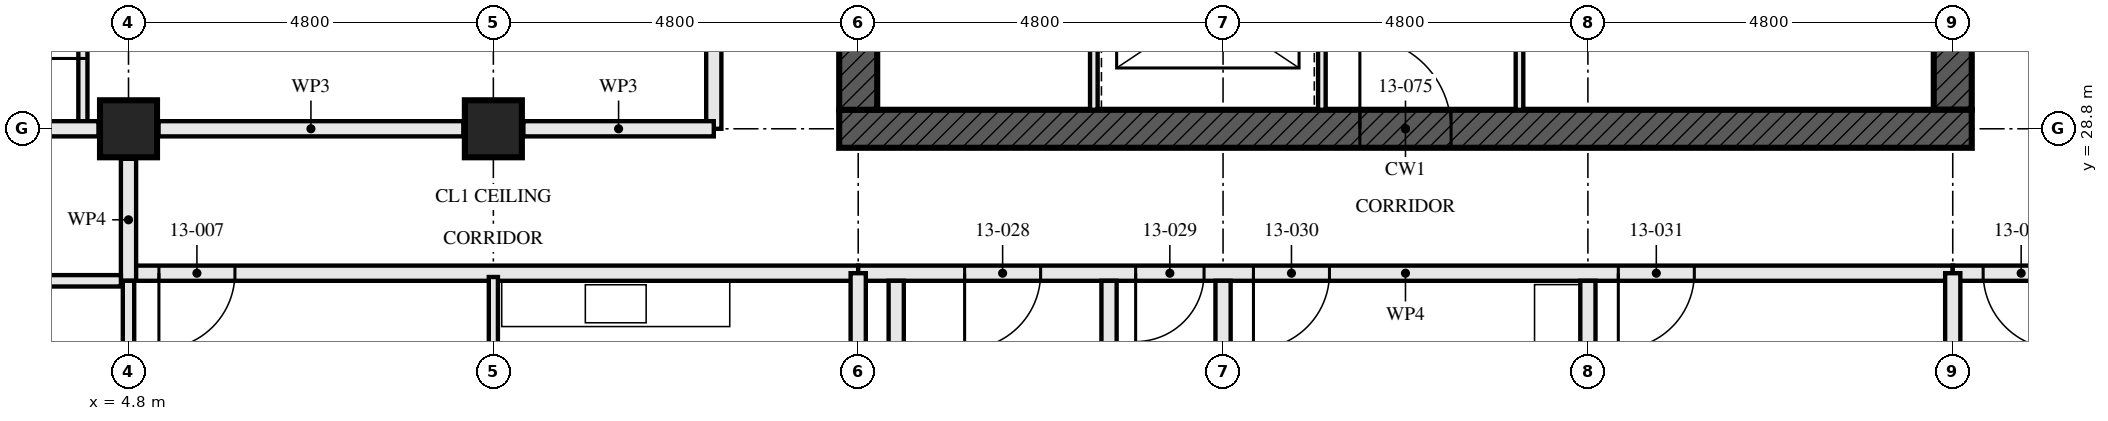
"""IFC4 building model, lengths in metres.
Left out: names, types, materials, properties, quantities, classifications, styles, units other than length and angle.
Written with IfcOpenShell. Run it as: python <this file> out.ifc"""

import sys

from ifc_helpers import new_model, si_unit, direction, frame, frame_2d, origin, origin_2d, place, context, subcontext, project, spatial, rectangle, hollow_rectangle, extrude, element, fill, save


model = new_model("IFC4")
c1 = context("Model", 3, precision=1e-05, world=origin(), true_north=direction((0.0, 1.0)))
c2 = subcontext(c1, "Body", "Model", "MODEL_VIEW")
j1 = project(units=[si_unit("LENGTHUNIT", "METRE"), si_unit("PLANEANGLEUNIT", "RADIAN")], contexts=[c1])
p1 = place(None, origin())
s1 = spatial("IfcSite", under=j1, at=p1, CompositionType="ELEMENT")
p2 = place(p1, origin())
s2 = spatial("IfcBuilding", under=s1, at=p2, CompositionType="ELEMENT")
p3 = place(p2, frame((0.0, 0.0, 51.5)))
s3 = spatial("IfcBuildingStorey", under=s2, at=p3, CompositionType="ELEMENT", Elevation=51.5)
for number, where, z_axis, x_axis in (
    (1, (4.8, 28.8, 0.0), (0.0, 0.0, 1.0), (0.0, 1.0, 0.0)),
    (2, (9.6, 28.8, 0.0), (0.0, 0.0, 1.0), (0.0, 1.0, 0.0)),
):
    element("IfcColumn", number, at=place(p3, frame(where, z_axis=z_axis, x_axis=x_axis)), inside=s3, PredefinedType="COLUMN", context=c2, shape_type="SweptSolid", body=[
        extrude(hollow_rectangle(XDim=0.75, YDim=0.75, WallThickness=0.08, at=origin_2d()), origin(), (0.0, 0.0, 1.0), 3.5),
    ])
p4 = place(p3, frame((14.15, 28.8, -0.17), z_axis=(0.0, 0.0, 1.0), x_axis=(1.0, 0.0, 0.0)))
e3 = element("IfcWall", 3, at=p4, inside=s3, PredefinedType="SHEAR", context=c2, shape_type="SweptSolid", body=[
    extrude(rectangle(XDim=14.9, YDim=0.5, at=frame_2d((7.45, 0.0))), origin(), (0.0, 0.0, 1.0), 3.5),
])
p5 = place(p4, frame((6.85, 0.0, 0.17)))
e4 = element("IfcOpeningElement", 4, at=p5, cuts=e3, PredefinedType="OPENING", context=c2, shape_type="SweptSolid", body=[
    extrude(rectangle(XDim=1.2, YDim=2.1, at=frame_2d((0.6, 1.05))), frame((0.0, 0.26, 0.0), z_axis=(0.0, -1.0, 0.0), x_axis=(1.0, 0.0, 0.0)), (0.0, 0.0, 1.0), 0.521),
])
p6 = place(p3, frame((14.4, 42.95, -0.17), z_axis=(0.0, 0.0, 1.0), x_axis=(0.0, -1.0, 0.0)))
e5 = element("IfcWall", 5, at=p6, inside=s3, PredefinedType="SHEAR", context=c2, shape_type="SweptSolid", body=[
    extrude(rectangle(XDim=13.9, YDim=0.5, at=frame_2d((6.95, 0.0))), origin(), (0.0, 0.0, 1.0), 3.5),
])
p7 = place(p6, frame((6.35, 0.0, 0.17)))
e6 = element("IfcOpeningElement", 6, at=p7, cuts=e5, PredefinedType="OPENING", context=c2, shape_type="SweptSolid", body=[
    extrude(rectangle(XDim=1.2, YDim=2.1, at=frame_2d((0.6, 1.05))), frame((0.0, 0.26, 0.0), z_axis=(0.0, -1.0, 0.0), x_axis=(1.0, 0.0, 0.0)), (0.0, 0.0, 1.0), 0.521),
])
p8 = place(p3, frame((28.8, 29.05, -0.17), z_axis=(0.0, 0.0, 1.0), x_axis=(0.0, 1.0, 0.0)))
e7 = element("IfcWall", 7, at=p8, inside=s3, PredefinedType="SHEAR", context=c2, shape_type="SweptSolid", body=[
    extrude(rectangle(XDim=13.9, YDim=0.5, at=frame_2d((6.95, 0.0))), origin(), (0.0, 0.0, 1.0), 3.5),
])
p9 = place(p8, frame((6.35, 0.0, 0.17)))
e8 = element("IfcOpeningElement", 8, at=p9, cuts=e7, PredefinedType="OPENING", context=c2, shape_type="SweptSolid", body=[
    extrude(rectangle(XDim=1.2, YDim=2.1, at=frame_2d((0.6, 1.05))), frame((0.0, 0.26, 0.0), z_axis=(0.0, -1.0, 0.0), x_axis=(1.0, 0.0, 0.0)), (0.0, 0.0, 1.0), 0.521),
])
p10 = place(p3, frame((4.8, 23.8, 0.0), z_axis=(0.0, 0.0, 1.0), x_axis=(0.0, 1.0, 0.0)))
e9 = element("IfcWall", 9, at=p10, inside=s3, PredefinedType="PARTITIONING", context=c2, shape_type="SweptSolid", body=[
    extrude(rectangle(XDim=3.0, YDim=0.15, at=frame_2d((1.5, 0.0))), origin(), (0.0, 0.0, 1.0), 2.55),
])
p11 = place(p10, frame((1.05, 0.0, 0.0)))
e10 = element("IfcOpeningElement", 10, at=p11, cuts=e9, PredefinedType="OPENING", context=c2, shape_type="SweptSolid", body=[
    extrude(rectangle(XDim=0.9, YDim=2.1, at=frame_2d((0.45, 1.05))), frame((0.0, 0.085, 0.0), z_axis=(0.0, -1.0, 0.0), x_axis=(1.0, 0.0, 0.0)), (0.0, 0.0, 1.0), 0.171),
])
p12 = place(p3, frame((9.6, 18.6, 0.0), z_axis=(0.0, 0.0, 1.0), x_axis=(0.0, 1.0, 0.0)))
e11 = element("IfcWall", 11, at=p12, inside=s3, PredefinedType="PARTITIONING", context=c2, shape_type="SweptSolid", body=[
    extrude(rectangle(XDim=8.25, YDim=0.12, at=frame_2d((4.125, 0.0))), origin(), (0.0, 0.0, 1.0), 2.55),
])
p13 = place(p12, frame((5.15, 0.0, 0.0)))
e12 = element("IfcOpeningElement", 12, at=p13, cuts=e11, PredefinedType="OPENING", context=c2, shape_type="SweptSolid", body=[
    extrude(rectangle(XDim=0.9, YDim=2.1, at=frame_2d((0.45, 1.05))), frame((0.0, 0.071, 0.0), z_axis=(0.0, -1.0, 0.0), x_axis=(1.0, 0.0, 0.0)), (0.0, 0.0, 1.0), 0.141),
])
p14 = place(p3, frame((4.8, 26.9, 0.0), z_axis=(0.0, 0.0, 1.0), x_axis=(1.0, 0.0, 0.0)))
e13 = element("IfcWall", 13, at=p14, inside=s3, PredefinedType="PARTITIONING", context=c2, shape_type="SweptSolid", body=[
    extrude(rectangle(XDim=9.6, YDim=0.2, at=frame_2d((4.8, 0.0))), origin(), (0.0, 0.0, 1.0), 3.33),
])
p15 = place(p14, frame((0.4, 0.0, 0.0)))
e14 = element("IfcOpeningElement", 14, at=p15, cuts=e13, PredefinedType="OPENING", context=c2, shape_type="SweptSolid", body=[
    extrude(rectangle(XDim=1.0, YDim=2.1, at=frame_2d((0.5, 1.05))), frame((0.0, 0.111, 0.0), z_axis=(0.0, -1.0, 0.0), x_axis=(1.0, 0.0, 0.0)), (0.0, 0.0, 1.0), 0.221),
])
p16 = place(p3, frame((4.8, 26.8, 0.0), z_axis=(0.0, 0.0, 1.0), x_axis=(0.0, 1.0, 0.0)))
e15 = element("IfcWall", 15, at=p16, inside=s3, PredefinedType="PARTITIONING", context=c2, shape_type="SweptSolid", body=[
    extrude(rectangle(XDim=1.605, YDim=0.2, at=frame_2d((0.802, 0.0))), origin(), (0.0, 0.0, 1.0), 3.33),
])
p17 = place(p3, frame((4.2, 33.6, 0.0), z_axis=(0.0, 0.0, 1.0), x_axis=(0.0, -1.0, 0.0)))
e16 = element("IfcWall", 16, at=p17, inside=s3, PredefinedType="PARTITIONING", context=c2, shape_type="SweptSolid", body=[
    extrude(rectangle(XDim=4.8, YDim=0.12, at=frame_2d((2.4, 0.0))), origin(), (0.0, 0.0, 1.0), 3.33),
])
p18 = place(p17, frame((2.975, 0.0, 0.0)))
e17 = element("IfcOpeningElement", 17, at=p18, cuts=e16, PredefinedType="OPENING", context=c2, shape_type="SweptSolid", body=[
    extrude(rectangle(XDim=0.9, YDim=2.1, at=frame_2d((0.45, 1.05))), frame((0.0, 0.071, 0.0), z_axis=(0.0, -1.0, 0.0), x_axis=(1.0, 0.0, 0.0)), (0.0, 0.0, 1.0), 0.141),
])
p19 = place(p3, frame((12.5, 43.2, 0.0), z_axis=(0.0, 0.0, 1.0), x_axis=(0.0, -1.0, 0.0)))
e18 = element("IfcWall", 18, at=p19, inside=s3, PredefinedType="PARTITIONING", context=c2, shape_type="SweptSolid", body=[
    extrude(rectangle(XDim=14.4, YDim=0.2, at=frame_2d((7.2, 0.0))), origin(), (0.0, 0.0, 1.0), 2.55),
])
p20 = place(p19, frame((1.4, 0.0, 0.0)))
e19 = element("IfcOpeningElement", 19, at=p20, cuts=e18, PredefinedType="OPENING", context=c2, shape_type="SweptSolid", body=[
    extrude(rectangle(XDim=1.0, YDim=2.1, at=frame_2d((0.5, 1.05))), frame((0.0, 0.111, 0.0), z_axis=(0.0, -1.0, 0.0), x_axis=(1.0, 0.0, 0.0)), (0.0, 0.0, 1.0), 0.221),
])
p21 = place(p19, frame((5.2, 0.0, 0.0)))
e20 = element("IfcOpeningElement", 20, at=p21, cuts=e18, PredefinedType="OPENING", context=c2, shape_type="SweptSolid", body=[
    extrude(rectangle(XDim=1.0, YDim=2.1, at=frame_2d((0.5, 1.05))), frame((0.0, 0.111, 0.0), z_axis=(0.0, -1.0, 0.0), x_axis=(1.0, 0.0, 0.0)), (0.0, 0.0, 1.0), 0.221),
])
p22 = place(p19, frame((10.0, 0.0, 0.0)))
e21 = element("IfcOpeningElement", 21, at=p22, cuts=e18, PredefinedType="OPENING", context=c2, shape_type="SweptSolid", body=[
    extrude(rectangle(XDim=1.0, YDim=2.1, at=frame_2d((0.5, 1.05))), frame((0.0, 0.111, 0.0), z_axis=(0.0, -1.0, 0.0), x_axis=(1.0, 0.0, 0.0)), (0.0, 0.0, 1.0), 0.221),
])
for number, where, z_axis, x_axis in (
    (22, (14.9, 22.1, 0.0), (0.0, 0.0, 1.0), (0.0, 1.0, 0.0)),
    (23, (17.7, 22.1, 0.0), (0.0, 0.0, 1.0), (0.0, 1.0, 0.0)),
):
    element("IfcWall", number, at=place(p3, frame(where, z_axis=z_axis, x_axis=x_axis)), inside=s3, PredefinedType="SOLIDWALL", context=c2, shape_type="SweptSolid", body=[
        extrude(rectangle(XDim=4.7, YDim=0.2, at=frame_2d((2.35, 0.0))), origin(), (0.0, 0.0, 1.0), 2.99),
    ])
for number, where, z_axis, x_axis in (
    (24, (19.2, 14.795, 0.0), (0.0, 0.0, 1.0), (0.0, 1.0, 0.0)),
    (25, (24.0, 14.795, 0.0), (0.0, 0.0, 1.0), (0.0, 1.0, 0.0)),
):
    element("IfcWall", number, at=place(p3, frame(where, z_axis=z_axis, x_axis=x_axis)), inside=s3, PredefinedType="PARTITIONING", context=c2, shape_type="SweptSolid", body=[
        extrude(rectangle(XDim=12.005, YDim=0.2, at=frame_2d((6.002, 0.0))), origin(), (0.0, 0.0, 1.0), 2.55),
    ])
p23 = place(p3, frame((14.4, 26.9, 0.0), z_axis=(0.0, 0.0, 1.0), x_axis=(1.0, 0.0, 0.0)))
e26 = element("IfcWall", 26, at=p23, inside=s3, PredefinedType="PARTITIONING", context=c2, shape_type="SweptSolid", body=[
    extrude(rectangle(XDim=14.4, YDim=0.2, at=frame_2d((7.2, 0.0))), origin(), (0.0, 0.0, 1.0), 2.55),
])
p24 = place(p23, frame((1.4, 0.0, 0.0)))
e27 = element("IfcOpeningElement", 27, at=p24, cuts=e26, PredefinedType="OPENING", context=c2, shape_type="SweptSolid", body=[
    extrude(rectangle(XDim=1.0, YDim=2.1, at=frame_2d((0.5, 1.05))), frame((0.0, 0.111, 0.0), z_axis=(0.0, -1.0, 0.0), x_axis=(1.0, 0.0, 0.0)), (0.0, 0.0, 1.0), 0.221),
])
p25 = place(p23, frame((3.65, 0.0, 0.0)))
e28 = element("IfcOpeningElement", 28, at=p25, cuts=e26, PredefinedType="OPENING", context=c2, shape_type="SweptSolid", body=[
    extrude(rectangle(XDim=0.9, YDim=2.1, at=frame_2d((0.45, 1.05))), frame((0.0, 0.111, 0.0), z_axis=(0.0, -1.0, 0.0), x_axis=(1.0, 0.0, 0.0)), (0.0, 0.0, 1.0), 0.221),
])
p26 = place(p23, frame((5.2, 0.0, 0.0)))
e29 = element("IfcOpeningElement", 29, at=p26, cuts=e26, PredefinedType="OPENING", context=c2, shape_type="SweptSolid", body=[
    extrude(rectangle(XDim=1.0, YDim=2.1, at=frame_2d((0.5, 1.05))), frame((0.0, 0.111, 0.0), z_axis=(0.0, -1.0, 0.0), x_axis=(1.0, 0.0, 0.0)), (0.0, 0.0, 1.0), 0.221),
])
p27 = place(p23, frame((10.0, 0.0, 0.0)))
e30 = element("IfcOpeningElement", 30, at=p27, cuts=e26, PredefinedType="OPENING", context=c2, shape_type="SweptSolid", body=[
    extrude(rectangle(XDim=1.0, YDim=2.1, at=frame_2d((0.5, 1.05))), frame((0.0, 0.111, 0.0), z_axis=(0.0, -1.0, 0.0), x_axis=(1.0, 0.0, 0.0)), (0.0, 0.0, 1.0), 0.221),
])
p28 = place(p3, frame((28.8, 26.9, 0.0), z_axis=(0.0, 0.0, 1.0), x_axis=(1.0, 0.0, 0.0)))
e31 = element("IfcWall", 31, at=p28, inside=s3, PredefinedType="PARTITIONING", context=c2, shape_type="SweptSolid", body=[
    extrude(rectangle(XDim=9.6, YDim=0.2, at=frame_2d((4.8, 0.0))), origin(), (0.0, 0.0, 1.0), 3.33),
])
p29 = place(p28, frame((0.4, 0.0, 0.0)))
e32 = element("IfcOpeningElement", 32, at=p29, cuts=e31, PredefinedType="OPENING", context=c2, shape_type="SweptSolid", body=[
    extrude(rectangle(XDim=1.0, YDim=2.1, at=frame_2d((0.5, 1.05))), frame((0.0, 0.111, 0.0), z_axis=(0.0, -1.0, 0.0), x_axis=(1.0, 0.0, 0.0)), (0.0, 0.0, 1.0), 0.221),
])
p30 = place(p3, frame((20.5, 29.05, 0.0), z_axis=(0.0, 0.0, 1.0), x_axis=(0.0, 1.0, 0.0)))
e33 = element("IfcWall", 33, at=p30, inside=s3, PredefinedType="SOLIDWALL", context=c2, shape_type="SweptSolid", body=[
    extrude(rectangle(XDim=5.8, YDim=0.1, at=frame_2d((2.9, 0.0))), origin(), (0.0, 0.0, 1.0), 3.33),
])
p31 = place(p30, frame((0.8, 0.0, 0.0)))
e34 = element("IfcOpeningElement", 34, at=p31, cuts=e33, PredefinedType="OPENING", context=c2, shape_type="SweptSolid", body=[
    extrude(rectangle(XDim=1.1, YDim=2.3, at=frame_2d((0.55, 1.15))), frame((0.0, 0.061, 0.0), z_axis=(0.0, -1.0, 0.0), x_axis=(1.0, 0.0, 0.0)), (0.0, 0.0, 1.0), 0.121),
])
p32 = place(p30, frame((3.775, 0.0, 0.0)))
e35 = element("IfcOpeningElement", 35, at=p32, cuts=e33, PredefinedType="OPENING", context=c2, shape_type="SweptSolid", body=[
    extrude(rectangle(XDim=1.1, YDim=2.3, at=frame_2d((0.55, 1.15))), frame((0.0, 0.061, 0.0), z_axis=(0.0, -1.0, 0.0), x_axis=(1.0, 0.0, 0.0)), (0.0, 0.0, 1.0), 0.121),
])
p33 = place(p3, frame((23.1, 29.05, 0.0), z_axis=(0.0, 0.0, 1.0), x_axis=(0.0, 1.0, 0.0)))
e36 = element("IfcWall", 36, at=p33, inside=s3, PredefinedType="SOLIDWALL", context=c2, shape_type="SweptSolid", body=[
    extrude(rectangle(XDim=5.8, YDim=0.1, at=frame_2d((2.9, 0.0))), origin(), (0.0, 0.0, 1.0), 3.33),
])
p34 = place(p33, frame((1.0, 0.0, 0.0)))
e37 = element("IfcOpeningElement", 37, at=p34, cuts=e36, PredefinedType="OPENING", context=c2, shape_type="SweptSolid", body=[
    extrude(rectangle(XDim=0.7, YDim=2.1, at=frame_2d((0.35, 1.05))), frame((0.0, 0.061, 0.0), z_axis=(0.0, -1.0, 0.0), x_axis=(1.0, 0.0, 0.0)), (0.0, 0.0, 1.0), 0.121),
])
p35 = place(p3, frame((17.5, 29.05, 0.0), z_axis=(0.0, 0.0, 1.0), x_axis=(0.0, 1.0, 0.0)))
e38 = element("IfcWall", 38, at=p35, inside=s3, PredefinedType="SOLIDWALL", context=c2, shape_type="SweptSolid", body=[
    extrude(rectangle(XDim=5.8, YDim=0.1, at=frame_2d((2.9, 0.0))), origin(), (0.0, 0.0, 1.0), 3.33),
])
p36 = place(p3, frame((12.5, 28.8, 0.0), z_axis=(0.0, 0.0, 1.0), x_axis=(-1.0, 0.0, 0.0)))
e39 = element("IfcWall", 39, at=p36, inside=s3, PredefinedType="PARTITIONING", context=c2, shape_type="SweptSolid", body=[
    extrude(rectangle(XDim=2.505, YDim=0.2, at=frame_2d((1.252, 0.0))), origin(), (0.0, 0.0, 1.0), 2.32),
])
p37 = place(p3, frame((9.205, 28.8, 0.0), z_axis=(0.0, 0.0, 1.0), x_axis=(-1.0, 0.0, 0.0)))
e40 = element("IfcWall", 40, at=p37, inside=s3, PredefinedType="PARTITIONING", context=c2, shape_type="SweptSolid", body=[
    extrude(rectangle(XDim=4.01, YDim=0.2, at=frame_2d((2.005, 0.0))), origin(), (0.0, 0.0, 1.0), 2.32),
])
p38 = place(p3, frame((4.405, 28.8, 0.0), z_axis=(0.0, 0.0, 1.0), x_axis=(-1.0, 0.0, 0.0)))
e41 = element("IfcWall", 41, at=p38, inside=s3, PredefinedType="PARTITIONING", context=c2, shape_type="SweptSolid", body=[
    extrude(rectangle(XDim=4.101, YDim=0.2, at=frame_2d((2.05, 0.0))), origin(), (0.0, 0.0, 1.0), 2.32),
])
for number, where, z_axis, x_axis in (
    (42, (14.4, 24.395, 0.0), (0.0, 0.0, 1.0), (0.0, 1.0, 0.0)),
    (43, (28.8, 24.395, 0.0), (0.0, 0.0, 1.0), (0.0, 1.0, 0.0)),
):
    element("IfcWall", number, at=place(p3, frame(where, z_axis=z_axis, x_axis=x_axis)), inside=s3, PredefinedType="PARTITIONING", context=c2, shape_type="SweptSolid", body=[
        extrude(rectangle(XDim=2.505, YDim=0.2, at=frame_2d((1.252, 0.0))), origin(), (0.0, 0.0, 1.0), 2.32),
    ])
p39 = place(p3, frame((-0.43, 26.8, 0.0), z_axis=(0.0, 0.0, 1.0), x_axis=(1.0, 0.0, 0.0)))
e44 = element("IfcWall", 44, at=p39, inside=s3, PredefinedType="PARTITIONING", context=c2, shape_type="SweptSolid", body=[
    extrude(rectangle(XDim=5.13, YDim=0.15, at=frame_2d((2.565, 0.0))), origin(), (0.0, 0.0, 1.0), 2.32),
])
p40 = place(p15, frame((1.0, 0.0, 0.0), z_axis=(0.0, 0.0, 1.0), x_axis=(-1.0, 0.0, 0.0)))
e45 = element("IfcDoor", 45, at=p40, inside=s3, OperationType="SINGLE_SWING_LEFT", PredefinedType="DOOR", context=c2, shape_type="SweptSolid", body=[
    extrude(rectangle(XDim=1.0, YDim=2.1, at=frame_2d((0.5, 1.05))), frame((0.0, 0.027, 0.0), z_axis=(0.0, -1.0, 0.0), x_axis=(1.0, 0.0, 0.0)), (0.0, 0.0, 1.0), 0.054),
])
fill(e14, e45)
p41 = place(p18, frame((0.9, 0.0, 0.0), z_axis=(0.0, 0.0, 1.0), x_axis=(-1.0, 0.0, 0.0)))
e46 = element("IfcDoor", 46, at=p41, inside=s3, OperationType="SINGLE_SWING_RIGHT", PredefinedType="DOOR", context=c2, shape_type="SweptSolid", body=[
    extrude(rectangle(XDim=0.9, YDim=2.1, at=frame_2d((0.45, 1.05))), frame((0.0, 0.022, 0.0), z_axis=(0.0, -1.0, 0.0), x_axis=(1.0, 0.0, 0.0)), (0.0, 0.0, 1.0), 0.044),
])
fill(e17, e46)
p42 = place(p24, frame((1.0, 0.0, 0.0), z_axis=(0.0, 0.0, 1.0), x_axis=(-1.0, 0.0, 0.0)))
e47 = element("IfcDoor", 47, at=p42, inside=s3, OperationType="SINGLE_SWING_LEFT", PredefinedType="DOOR", context=c2, shape_type="SweptSolid", body=[
    extrude(rectangle(XDim=1.0, YDim=2.1, at=frame_2d((0.5, 1.05))), frame((0.0, 0.032, 0.0), z_axis=(0.0, -1.0, 0.0), x_axis=(1.0, 0.0, 0.0)), (0.0, 0.0, 1.0), 0.064),
])
fill(e27, e47)
p43 = place(p25, frame((0.9, 0.0, 0.0), z_axis=(0.0, 0.0, 1.0), x_axis=(-1.0, 0.0, 0.0)))
e48 = element("IfcDoor", 48, at=p43, inside=s3, OperationType="SINGLE_SWING_LEFT", PredefinedType="DOOR", context=c2, shape_type="SweptSolid", body=[
    extrude(rectangle(XDim=0.9, YDim=2.1, at=frame_2d((0.45, 1.05))), frame((0.0, 0.027, 0.0), z_axis=(0.0, -1.0, 0.0), x_axis=(1.0, 0.0, 0.0)), (0.0, 0.0, 1.0), 0.054),
])
fill(e28, e48)
p44 = place(p26, frame((1.0, 0.0, 0.0), z_axis=(0.0, 0.0, 1.0), x_axis=(-1.0, 0.0, 0.0)))
e49 = element("IfcDoor", 49, at=p44, inside=s3, OperationType="SINGLE_SWING_LEFT", PredefinedType="DOOR", context=c2, shape_type="SweptSolid", body=[
    extrude(rectangle(XDim=1.0, YDim=2.1, at=frame_2d((0.5, 1.05))), frame((0.0, 0.027, 0.0), z_axis=(0.0, -1.0, 0.0), x_axis=(1.0, 0.0, 0.0)), (0.0, 0.0, 1.0), 0.054),
])
fill(e29, e49)
p45 = place(p27, frame((1.0, 0.0, 0.0), z_axis=(0.0, 0.0, 1.0), x_axis=(-1.0, 0.0, 0.0)))
e50 = element("IfcDoor", 50, at=p45, inside=s3, OperationType="SINGLE_SWING_LEFT", PredefinedType="DOOR", context=c2, shape_type="SweptSolid", body=[
    extrude(rectangle(XDim=1.0, YDim=2.1, at=frame_2d((0.5, 1.05))), frame((0.0, 0.027, 0.0), z_axis=(0.0, -1.0, 0.0), x_axis=(1.0, 0.0, 0.0)), (0.0, 0.0, 1.0), 0.054),
])
fill(e30, e50)
p46 = place(p29, frame((1.0, 0.0, 0.0), z_axis=(0.0, 0.0, 1.0), x_axis=(-1.0, 0.0, 0.0)))
e51 = element("IfcDoor", 51, at=p46, inside=s3, OperationType="SINGLE_SWING_RIGHT", PredefinedType="DOOR", context=c2, shape_type="SweptSolid", body=[
    extrude(rectangle(XDim=1.0, YDim=2.1, at=frame_2d((0.5, 1.05))), frame((0.0, 0.027, 0.0), z_axis=(0.0, -1.0, 0.0), x_axis=(1.0, 0.0, 0.0)), (0.0, 0.0, 1.0), 0.054),
])
fill(e32, e51)
p47 = place(p5, origin())
e52 = element("IfcDoor", 52, at=p47, inside=s3, OperationType="SINGLE_SWING_LEFT", PredefinedType="DOOR", context=c2, shape_type="SweptSolid", body=[
    extrude(rectangle(XDim=1.2, YDim=2.1, at=frame_2d((0.6, 1.05))), frame((0.0, 0.027, 0.0), z_axis=(0.0, -1.0, 0.0), x_axis=(1.0, 0.0, 0.0)), (0.0, 0.0, 1.0), 0.054),
])
fill(e4, e52)
save(model, sys.argv[1])
